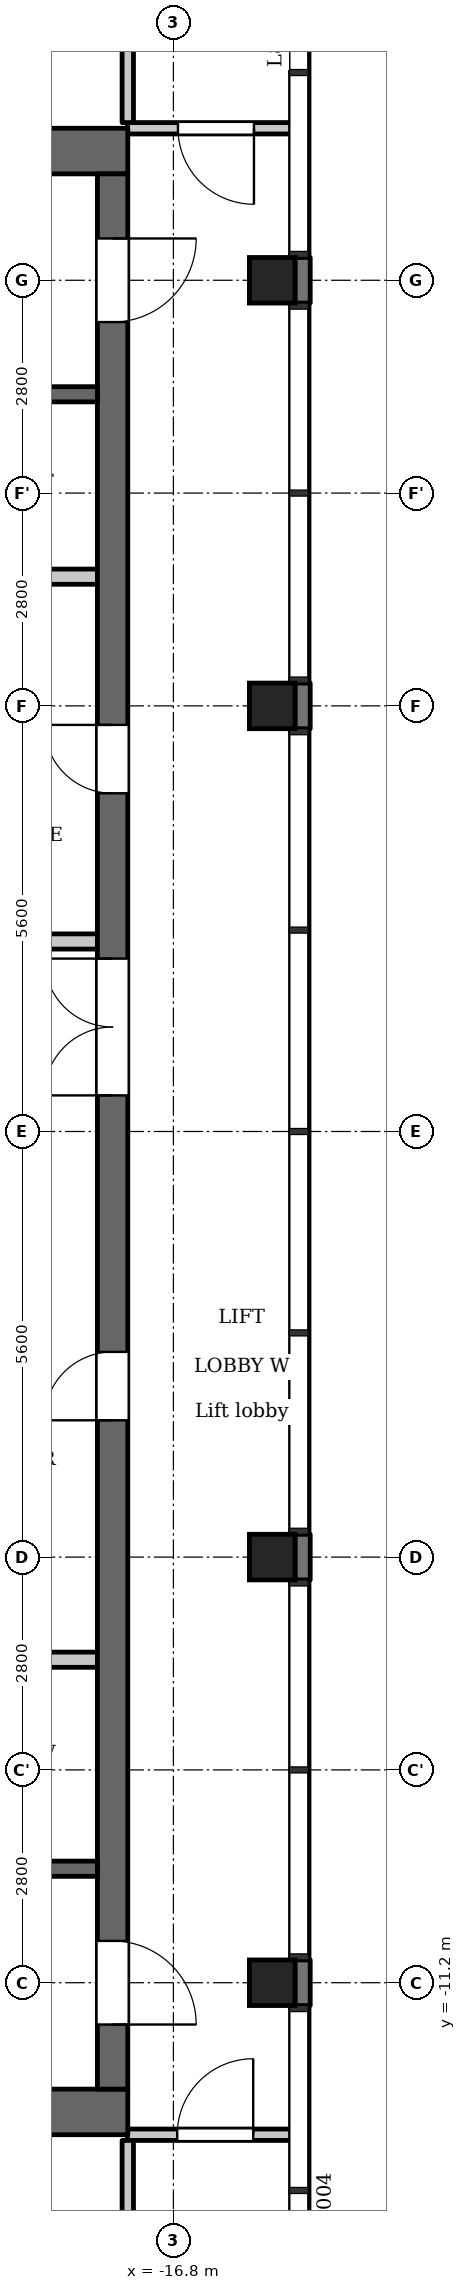
"""IFC4 building model, lengths in metres.
Left out: names, types, materials, properties, quantities, classifications, styles, units other than length and angle.
Written with IfcOpenShell. Run it as: python <this file> out.ifc"""

import sys

from ifc_helpers import new_model, si_unit, direction, frame, frame_2d, origin, origin_2d, place, context, subcontext, project, spatial, polyline, rectangle, outline, extrude, element, fill, save


model = new_model("IFC4")
c1 = context("Model", 3, precision=1e-05, world=origin(), true_north=direction((0.0, 1.0)))
c2 = subcontext(c1, "Body", "Model", "MODEL_VIEW")
j1 = project(units=[si_unit("LENGTHUNIT", "METRE"), si_unit("PLANEANGLEUNIT", "RADIAN")], contexts=[c1])
p1 = place(None, origin())
s1 = spatial("IfcSite", under=j1, at=p1, CompositionType="ELEMENT")
p2 = place(p1, origin())
s2 = spatial("IfcBuilding", under=s1, at=p2, CompositionType="ELEMENT")
p3 = place(p2, frame((0.0, 0.0, 313.9)))
s3 = spatial("IfcBuildingStorey", under=s2, at=p3, CompositionType="ELEMENT", Elevation=313.9)
for number, where, z_axis, x_axis in (
    (1, (-15.5, -11.2, 0.0), (0.0, 0.0, 1.0), (1.0, 0.0, 0.0)),
    (2, (-15.5, -5.6, 0.0), (0.0, 0.0, 1.0), (1.0, 0.0, 0.0)),
    (3, (-15.5, 5.6, 0.0), (0.0, 0.0, 1.0), (1.0, 0.0, 0.0)),
    (4, (-15.5, 11.2, 0.0), (0.0, 0.0, 1.0), (1.0, 0.0, 0.0)),
):
    element("IfcColumn", number, at=place(p3, frame(where, z_axis=z_axis, x_axis=x_axis)), inside=s3, PredefinedType="COLUMN", context=c2, shape_type="SweptSolid", body=[
        extrude(rectangle(XDim=0.6, YDim=0.6, at=origin_2d()), origin(), (0.0, 0.0, 1.0), 3.5),
    ])
for number, where, z_axis, x_axis in (
    (5, (-17.4, 12.9, 0.0), (0.0, 0.0, 1.0), (-1.0, 0.0, 0.0)),
    (6, (-17.4, -12.9, 0.0), (0.0, 0.0, 1.0), (-1.0, 0.0, 0.0)),
):
    element("IfcWall", number, at=place(p3, frame(where, z_axis=z_axis, x_axis=x_axis)), inside=s3, PredefinedType="SHEAR", context=c2, shape_type="SweptSolid", body=[
        extrude(rectangle(XDim=7.6, YDim=0.6, at=frame_2d((3.8, 0.0))), origin(), (0.0, 0.0, 1.0), 3.2),
    ])
p4 = place(p3, frame((-17.6, -12.6, 0.0), z_axis=(0.0, 0.0, 1.0), x_axis=(0.0, 1.0, 0.0)))
e7 = element("IfcWall", 7, at=p4, inside=s3, PredefinedType="SHEAR", context=c2, shape_type="SweptSolid", body=[
    extrude(rectangle(XDim=25.2, YDim=0.4, at=frame_2d((12.6, 0.0))), origin(), (0.0, 0.0, 1.0), 3.2),
])
p5 = place(p4, frame((8.8, 0.0, 0.0)))
e8 = element("IfcOpeningElement", 8, at=p5, cuts=e7, PredefinedType="OPENING", context=c2, shape_type="SweptSolid", body=[
    extrude(rectangle(XDim=0.9, YDim=2.1, at=frame_2d((0.45, 1.05))), frame((0.0, 0.21, 0.0), z_axis=(0.0, -1.0, 0.0), x_axis=(1.0, 0.0, 0.0)), (0.0, 0.0, 1.0), 0.42),
])
p6 = place(p4, frame((17.05, 0.0, 0.0)))
e9 = element("IfcOpeningElement", 9, at=p6, cuts=e7, PredefinedType="OPENING", context=c2, shape_type="SweptSolid", body=[
    extrude(rectangle(XDim=0.9, YDim=2.1, at=frame_2d((0.45, 1.05))), frame((0.0, 0.21, 0.0), z_axis=(0.0, -1.0, 0.0), x_axis=(1.0, 0.0, 0.0)), (0.0, 0.0, 1.0), 0.42),
])
p7 = place(p4, frame((23.25, 0.0, 0.0)))
e10 = element("IfcOpeningElement", 10, at=p7, cuts=e7, PredefinedType="OPENING", context=c2, shape_type="SweptSolid", body=[
    extrude(rectangle(XDim=1.1, YDim=2.1, at=frame_2d((0.55, 1.05))), frame((0.0, 0.21, 0.0), z_axis=(0.0, -1.0, 0.0), x_axis=(1.0, 0.0, 0.0)), (0.0, 0.0, 1.0), 0.42),
])
p8 = place(p4, frame((0.85, 0.0, 0.0)))
e11 = element("IfcOpeningElement", 11, at=p8, cuts=e7, PredefinedType="OPENING", context=c2, shape_type="SweptSolid", body=[
    extrude(rectangle(XDim=1.1, YDim=2.1, at=frame_2d((0.55, 1.05))), frame((0.0, 0.21, 0.0), z_axis=(0.0, -1.0, 0.0), x_axis=(1.0, 0.0, 0.0)), (0.0, 0.0, 1.0), 0.42),
])
p9 = place(p4, frame((13.075, 0.0, 0.0)))
e12 = element("IfcOpeningElement", 12, at=p9, cuts=e7, PredefinedType="OPENING", context=c2, shape_type="SweptSolid", body=[
    extrude(rectangle(XDim=1.8, YDim=2.1, at=frame_2d((0.9, 1.05))), frame((0.0, 0.21, 0.0), z_axis=(0.0, -1.0, 0.0), x_axis=(1.0, 0.0, 0.0)), (0.0, 0.0, 1.0), 0.42),
])
p10 = place(p3, frame((-17.8, -9.7, 0.0), z_axis=(0.0, 0.0, 1.0), x_axis=(-1.0, 0.0, 0.0)))
e13 = element("IfcWall", 13, at=p10, inside=s3, PredefinedType="SHEAR", context=c2, shape_type="SweptSolid", body=[
    extrude(rectangle(XDim=5.8, YDim=0.2, at=frame_2d((2.9, 0.0))), origin(), (0.0, 0.0, 1.0), 3.2),
])
p11 = place(p10, frame((0.85, 0.0, 0.0)))
e14 = element("IfcOpeningElement", 14, at=p11, cuts=e13, PredefinedType="OPENING", context=c2, shape_type="SweptSolid", body=[
    extrude(rectangle(XDim=1.1, YDim=2.1, at=frame_2d((0.55, 1.05))), frame((0.0, 0.11, 0.0), z_axis=(0.0, -1.0, 0.0), x_axis=(1.0, 0.0, 0.0)), (0.0, 0.0, 1.0), 0.22),
])
p12 = place(p10, frame((3.75, 0.0, 0.0)))
e15 = element("IfcOpeningElement", 15, at=p12, cuts=e13, PredefinedType="OPENING", context=c2, shape_type="SweptSolid", body=[
    extrude(rectangle(XDim=1.1, YDim=2.1, at=frame_2d((0.55, 1.05))), frame((0.0, 0.11, 0.0), z_axis=(0.0, -1.0, 0.0), x_axis=(1.0, 0.0, 0.0)), (0.0, 0.0, 1.0), 0.22),
])
p13 = place(p3, frame((-17.8, -6.95, 0.0), z_axis=(0.0, 0.0, 1.0), x_axis=(-1.0, 0.0, 0.0)))
e16 = element("IfcWall", 16, at=p13, inside=s3, PredefinedType="PARTITIONING", context=c2, shape_type="SweptSolid", body=[
    extrude(rectangle(XDim=2.8, YDim=0.2, at=frame_2d((1.4, 0.0))), origin(), (0.0, 0.0, 1.0), 3.2),
])
p14 = place(p3, frame((-17.8, 2.5, 0.0), z_axis=(0.0, 0.0, 1.0), x_axis=(-1.0, 0.0, 0.0)))
e17 = element("IfcWall", 17, at=p14, inside=s3, PredefinedType="PARTITIONING", context=c2, shape_type="SweptSolid", body=[
    extrude(rectangle(XDim=3.0, YDim=0.2, at=frame_2d((1.5, 0.0))), origin(), (0.0, 0.0, 1.0), 3.2),
])
p15 = place(p3, frame((-17.8, 7.3, 0.0), z_axis=(0.0, 0.0, 1.0), x_axis=(-1.0, 0.0, 0.0)))
e18 = element("IfcWall", 18, at=p15, inside=s3, PredefinedType="PARTITIONING", context=c2, shape_type="SweptSolid", body=[
    extrude(rectangle(XDim=2.8, YDim=0.2, at=frame_2d((1.4, 0.0))), origin(), (0.0, 0.0, 1.0), 3.2),
])
p16 = place(p3, frame((-17.8, 9.7, 0.0), z_axis=(0.0, 0.0, 1.0), x_axis=(-1.0, 0.0, 0.0)))
e19 = element("IfcWall", 19, at=p16, inside=s3, PredefinedType="SHEAR", context=c2, shape_type="SweptSolid", body=[
    extrude(rectangle(XDim=5.8, YDim=0.2, at=frame_2d((2.9, 0.0))), origin(), (0.0, 0.0, 1.0), 3.2),
])
p17 = place(p16, frame((0.85, 0.0, 0.0)))
e20 = element("IfcOpeningElement", 20, at=p17, cuts=e19, PredefinedType="OPENING", context=c2, shape_type="SweptSolid", body=[
    extrude(rectangle(XDim=1.1, YDim=2.1, at=frame_2d((0.55, 1.05))), frame((0.0, 0.11, 0.0), z_axis=(0.0, -1.0, 0.0), x_axis=(1.0, 0.0, 0.0)), (0.0, 0.0, 1.0), 0.22),
])
p18 = place(p16, frame((3.75, 0.0, 0.0)))
e21 = element("IfcOpeningElement", 21, at=p18, cuts=e19, PredefinedType="OPENING", context=c2, shape_type="SweptSolid", body=[
    extrude(rectangle(XDim=1.1, YDim=2.1, at=frame_2d((0.55, 1.05))), frame((0.0, 0.11, 0.0), z_axis=(0.0, -1.0, 0.0), x_axis=(1.0, 0.0, 0.0)), (0.0, 0.0, 1.0), 0.22),
])
p19 = place(p3, frame((-17.405, -13.2, 0.0), z_axis=(0.0, 0.0, 1.0), x_axis=(1.0, 0.0, 0.0)))
e22 = element("IfcWall", 22, at=p19, inside=s3, PredefinedType="PARTITIONING", context=c2, shape_type="SweptSolid", body=[
    extrude(rectangle(XDim=2.217, YDim=0.15, at=frame_2d((1.108, 0.0))), origin(), (0.0, 0.0, 1.0), 3.2),
])
p20 = place(p19, frame((0.655, 0.0, 0.0)))
e23 = element("IfcOpeningElement", 23, at=p20, cuts=e22, PredefinedType="OPENING", context=c2, shape_type="SweptSolid", body=[
    extrude(rectangle(XDim=1.0, YDim=2.1, at=frame_2d((0.5, 1.05))), frame((0.0, 0.085, 0.0), z_axis=(0.0, -1.0, 0.0), x_axis=(1.0, 0.0, 0.0)), (0.0, 0.0, 1.0), 0.17),
])
p21 = place(p3, frame((-17.405, 13.2, 0.0), z_axis=(0.0, 0.0, 1.0), x_axis=(1.0, 0.0, 0.0)))
e24 = element("IfcWall", 24, at=p21, inside=s3, PredefinedType="PARTITIONING", context=c2, shape_type="SweptSolid", body=[
    extrude(rectangle(XDim=2.217, YDim=0.15, at=frame_2d((1.108, 0.0))), origin(), (0.0, 0.0, 1.0), 3.2),
])
p22 = place(p21, frame((0.665, 0.0, 0.0)))
e25 = element("IfcOpeningElement", 25, at=p22, cuts=e24, PredefinedType="OPENING", context=c2, shape_type="SweptSolid", body=[
    extrude(rectangle(XDim=1.0, YDim=2.1, at=frame_2d((0.5, 1.05))), frame((0.0, 0.085, 0.0), z_axis=(0.0, -1.0, 0.0), x_axis=(1.0, 0.0, 0.0)), (0.0, 0.0, 1.0), 0.17),
])
p23 = place(p3, frame((-17.4, -16.125, 0.0), z_axis=(0.0, 0.0, 1.0), x_axis=(0.0, 1.0, 0.0)))
e26 = element("IfcWall", 26, at=p23, inside=s3, PredefinedType="PARTITIONING", context=c2, shape_type="SweptSolid", body=[
    extrude(rectangle(XDim=2.85, YDim=0.15, at=frame_2d((1.425, 0.0))), origin(), (0.0, 0.0, 1.0), 3.2),
])
p24 = place(p23, frame((0.875, 0.0, 0.0)))
e27 = element("IfcOpeningElement", 27, at=p24, cuts=e26, PredefinedType="OPENING", context=c2, shape_type="SweptSolid", body=[
    extrude(rectangle(XDim=0.9, YDim=2.1, at=frame_2d((0.45, 1.05))), frame((0.0, 0.085, 0.0), z_axis=(0.0, -1.0, 0.0), x_axis=(1.0, 0.0, 0.0)), (0.0, 0.0, 1.0), 0.17),
])
p25 = place(p3, frame((-17.4, 13.275, 0.0), z_axis=(0.0, 0.0, 1.0), x_axis=(0.0, 1.0, 0.0)))
e28 = element("IfcWall", 28, at=p25, inside=s3, PredefinedType="PARTITIONING", context=c2, shape_type="SweptSolid", body=[
    extrude(rectangle(XDim=3.45, YDim=0.15, at=frame_2d((1.725, 0.0))), origin(), (0.0, 0.0, 1.0), 3.2),
])
p26 = place(p25, frame((1.125, 0.0, 0.0)))
e29 = element("IfcOpeningElement", 29, at=p26, cuts=e28, PredefinedType="OPENING", context=c2, shape_type="SweptSolid", body=[
    extrude(rectangle(XDim=1.0, YDim=2.1, at=frame_2d((0.5, 1.05))), frame((0.0, 0.085, 0.0), z_axis=(0.0, -1.0, 0.0), x_axis=(1.0, 0.0, 0.0)), (0.0, 0.0, 1.0), 0.17),
])
p27 = place(p3, origin())
e30 = element("IfcWall", 30, at=p27, inside=s3, PredefinedType="SOLIDWALL", context=c2, shape_type="SweptSolid", body=[
    extrude(outline(polyline([(-15.2, 10.9), (-15.0, 10.9), (-15.0, 11.5), (-15.2, 11.5), (-15.2, 10.9)])), origin(), (0.0, 0.0, 1.0), 3.2),
])
e31 = element("IfcWall", 31, at=p27, inside=s3, PredefinedType="SOLIDWALL", context=c2, shape_type="SweptSolid", body=[
    extrude(outline(polyline([(-15.2, 5.3), (-15.0, 5.3), (-15.0, 5.9), (-15.3, 5.9), (-15.2, 5.9), (-15.2, 5.3)])), origin(), (0.0, 0.0, 1.0), 3.2),
])
e32 = element("IfcWall", 32, at=p27, inside=s3, PredefinedType="SOLIDWALL", context=c2, shape_type="SweptSolid", body=[
    extrude(outline(polyline([(-15.3, -5.9), (-15.0, -5.9), (-15.0, -5.3), (-15.3, -5.3), (-15.2, -5.3), (-15.2, -5.9), (-15.3, -5.9)])), origin(), (0.0, 0.0, 1.0), 3.2),
])
e33 = element("IfcWall", 33, at=p27, inside=s3, PredefinedType="SOLIDWALL", context=c2, shape_type="SweptSolid", body=[
    extrude(outline(polyline([(-15.2, -11.5), (-15.0, -11.5), (-15.0, -10.9), (-15.2, -10.9), (-15.2, -11.5)])), origin(), (0.0, 0.0, 1.0), 3.2),
])
p28 = place(p5, origin())
e34 = element("IfcDoor", 34, at=p28, inside=s3, OperationType="SINGLE_SWING_RIGHT", PredefinedType="DOOR", context=c2, shape_type="SweptSolid", body=[
    extrude(rectangle(XDim=0.9, YDim=2.1, at=frame_2d((0.45, 1.05))), frame((0.0, 0.025, 0.0), z_axis=(0.0, -1.0, 0.0), x_axis=(1.0, 0.0, 0.0)), (0.0, 0.0, 1.0), 0.05),
])
fill(e8, e34)
p29 = place(p6, origin())
e35 = element("IfcDoor", 35, at=p29, inside=s3, OperationType="SINGLE_SWING_LEFT", PredefinedType="DOOR", context=c2, shape_type="SweptSolid", body=[
    extrude(rectangle(XDim=0.9, YDim=2.1, at=frame_2d((0.45, 1.05))), frame((0.0, 0.025, 0.0), z_axis=(0.0, -1.0, 0.0), x_axis=(1.0, 0.0, 0.0)), (0.0, 0.0, 1.0), 0.05),
])
fill(e9, e35)
p30 = place(p7, origin())
e36 = element("IfcDoor", 36, at=p30, inside=s3, OperationType="SINGLE_SWING_RIGHT", PredefinedType="DOOR", context=c2, shape_type="SweptSolid", body=[
    extrude(rectangle(XDim=1.1, YDim=2.1, at=frame_2d((0.55, 1.05))), frame((0.0, 0.025, 0.0), z_axis=(0.0, -1.0, 0.0), x_axis=(1.0, 0.0, 0.0)), (0.0, 0.0, 1.0), 0.05),
])
fill(e10, e36)
p31 = place(p8, origin())
e37 = element("IfcDoor", 37, at=p31, inside=s3, OperationType="SINGLE_SWING_LEFT", PredefinedType="DOOR", context=c2, shape_type="SweptSolid", body=[
    extrude(rectangle(XDim=1.1, YDim=2.1, at=frame_2d((0.55, 1.05))), frame((0.0, 0.025, 0.0), z_axis=(0.0, -1.0, 0.0), x_axis=(1.0, 0.0, 0.0)), (0.0, 0.0, 1.0), 0.05),
])
fill(e11, e37)
p32 = place(p9, origin())
e38 = element("IfcDoor", 38, at=p32, inside=s3, OperationType="DOUBLE_DOOR_SINGLE_SWING", PredefinedType="DOOR", context=c2, shape_type="SweptSolid", body=[
    extrude(rectangle(XDim=1.8, YDim=2.1, at=frame_2d((0.9, 1.05))), frame((0.0, 0.025, 0.0), z_axis=(0.0, -1.0, 0.0), x_axis=(1.0, 0.0, 0.0)), (0.0, 0.0, 1.0), 0.05),
])
fill(e12, e38)
p33 = place(p22, origin())
e39 = element("IfcDoor", 39, at=p33, inside=s3, OperationType="SINGLE_SWING_RIGHT", PredefinedType="DOOR", context=c2, shape_type="SweptSolid", body=[
    extrude(rectangle(XDim=1.0, YDim=2.1, at=frame_2d((0.5, 1.05))), frame((0.0, 0.025, 0.0), z_axis=(0.0, -1.0, 0.0), x_axis=(1.0, 0.0, 0.0)), (0.0, 0.0, 1.0), 0.05),
])
fill(e25, e39)
p34 = place(p20, origin())
e40 = element("IfcDoor", 40, at=p34, inside=s3, OperationType="SINGLE_SWING_LEFT", PredefinedType="DOOR", context=c2, shape_type="SweptSolid", body=[
    extrude(rectangle(XDim=1.0, YDim=2.1, at=frame_2d((0.5, 1.05))), frame((0.0, 0.025, 0.0), z_axis=(0.0, -1.0, 0.0), x_axis=(1.0, 0.0, 0.0)), (0.0, 0.0, 1.0), 0.05),
])
fill(e23, e40)
save(model, sys.argv[1])
